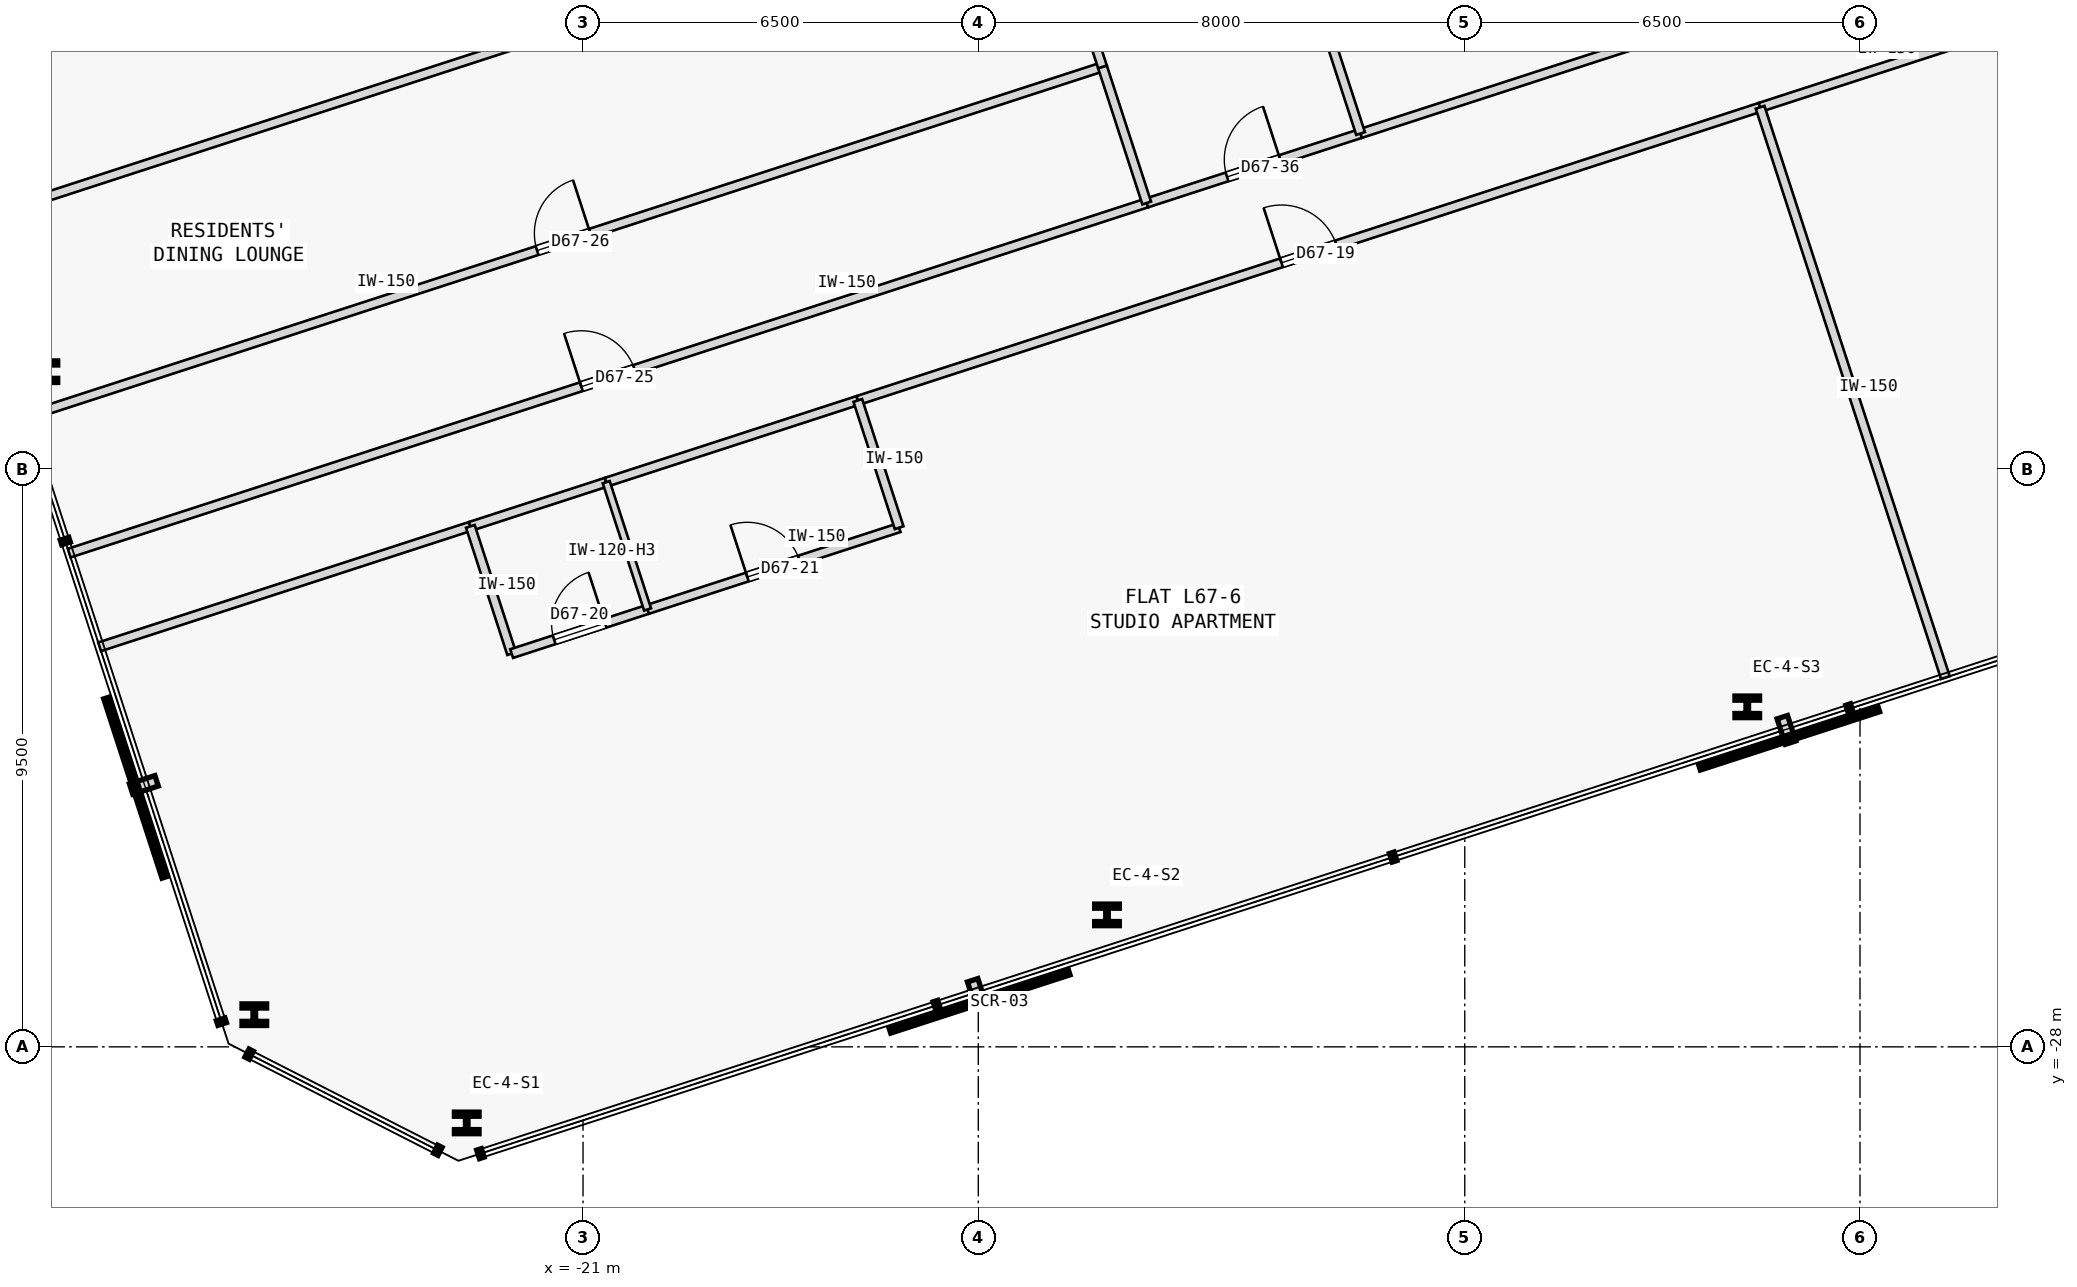
"""IFC4 building model, lengths in metres.
Left out: names, types, materials, properties, quantities, classifications, styles, units other than length and angle.
Written with IfcOpenShell. Run it as: python <this file> out.ifc"""

import sys

from ifc_helpers import new_model, si_unit, direction, frame, frame_2d, origin, origin_2d, place, context, subcontext, project, spatial, rectangle, i_section, extrude, element, fill, save


model = new_model("IFC4")
c1 = context("Model", 3, precision=1e-05, world=origin(), true_north=direction((0.0, 1.0)))
c2 = subcontext(c1, "Body", "Model", "MODEL_VIEW")
j1 = project(units=[si_unit("LENGTHUNIT", "METRE"), si_unit("PLANEANGLEUNIT", "RADIAN")], contexts=[c1])
p1 = place(None, origin())
s1 = spatial("IfcSite", under=j1, at=p1, CompositionType="ELEMENT")
p2 = place(p1, origin())
s2 = spatial("IfcBuilding", under=s1, at=p2, CompositionType="ELEMENT")
p3 = place(p2, frame((0.0, 0.0, 251.1)))
s3 = spatial("IfcBuildingStorey", under=s2, at=p3, CompositionType="ELEMENT", Elevation=251.1)
for number, where, z_axis, x_axis in (
    (1, (-22.913, -29.251, 0.0), (0.0, 0.0, 1.0), (1.0, 0.0, 0.0)),
    (2, (-12.384, -25.83, 0.0), (0.0, 0.0, 1.0), (1.0, 0.0, 0.0)),
    (3, (-1.854, -22.409, 0.0), (0.0, 0.0, 1.0), (1.0, 0.0, 0.0)),
    (4, (-29.842, -16.897, 0.0), (0.0, 0.0, 1.0), (1.0, 0.0, 0.0)),
    (5, (-26.406, -27.471, 0.0), (0.0, 0.0, 1.0), (1.0, 0.0, 0.0)),
):
    element("IfcColumn", number, at=place(p3, frame(where, z_axis=z_axis, x_axis=x_axis)), inside=s3, PredefinedType="COLUMN", context=c2, shape_type="SweptSolid", body=[
        extrude(i_section(OverallWidth=0.405, OverallDepth=0.355, WebThickness=0.042, FlangeThickness=0.068, FilletRadius=0.015, at=origin_2d()), origin(), (0.0, 0.0, 1.0), 3.35),
    ])
p4 = place(p3, frame((-28.95, -21.421, 0.0), z_axis=(0.0, 0.0, 1.0), x_axis=(0.951048062645, 0.309043010825, 0.0)))
e6 = element("IfcWall", 6, at=p4, inside=s3, PredefinedType="PARTITIONING", context=c2, shape_type="SweptSolid", body=[
    extrude(rectangle(XDim=6.41, YDim=0.15, at=frame_2d((3.205, 0.0))), origin(), (0.0, 0.0, 1.0), 2.95),
])
p5 = place(p3, frame((-16.482, -17.37, 0.0), z_axis=(0.0, 0.0, 1.0), x_axis=(0.9510563751, 0.309017428929, 0.0)))
e7 = element("IfcWall", 7, at=p5, inside=s3, PredefinedType="PARTITIONING", context=c2, shape_type="SweptSolid", body=[
    extrude(rectangle(XDim=15.602, YDim=0.15, at=frame_2d((7.801, 0.0))), origin(), (0.0, 0.0, 1.0), 2.95),
])
p6 = place(p5, frame((7.326, 0.0, 0.0)))
e8 = element("IfcOpeningElement", 8, at=p6, cuts=e7, PredefinedType="OPENING", context=c2, shape_type="SweptSolid", body=[
    extrude(rectangle(XDim=0.95, YDim=2.15, at=frame_2d((0.475, 1.075))), frame((0.0, 0.085, 0.0), z_axis=(0.0, -1.0, 0.0), x_axis=(1.0, 0.0, 0.0)), (0.0, 0.0, 1.0), 0.17),
])
p7 = place(p3, frame((-22.854, -19.44, 0.0), z_axis=(0.0, 0.0, 1.0), x_axis=(0.951076048914, 0.308956872689, 0.0)))
e9 = element("IfcWall", 9, at=p7, inside=s3, PredefinedType="PARTITIONING", context=c2, shape_type="SweptSolid", body=[
    extrude(rectangle(XDim=2.35, YDim=0.15, at=frame_2d((1.175, 0.0))), origin(), (0.0, 0.0, 1.0), 2.95),
])
p8 = place(p3, frame((-20.619, -18.714, 0.0), z_axis=(0.0, 0.0, 1.0), x_axis=(0.951052627573, 0.309028962374, 0.0)))
e10 = element("IfcWall", 10, at=p8, inside=s3, PredefinedType="PARTITIONING", context=c2, shape_type="SweptSolid", body=[
    extrude(rectangle(XDim=4.35, YDim=0.15, at=frame_2d((2.175, 0.0))), origin(), (0.0, 0.0, 1.0), 2.95),
])
p9 = place(p3, frame((-1.643, -12.549, 0.0), z_axis=(0.0, 0.0, 1.0), x_axis=(0.951058161173, 0.309011931914, 0.0)))
e11 = element("IfcWall", 11, at=p9, inside=s3, PredefinedType="PARTITIONING", context=c2, shape_type="SweptSolid", body=[
    extrude(rectangle(XDim=7.297, YDim=0.15, at=frame_2d((3.648, 0.0))), origin(), (0.0, 0.0, 1.0), 2.95),
])
p10 = place(p3, frame((-29.45, -19.881, 0.0), z_axis=(0.0, 0.0, 1.0), x_axis=(0.95105650271, 0.309017036186, 0.0)))
e12 = element("IfcWall", 12, at=p10, inside=s3, PredefinedType="PARTITIONING", context=c2, shape_type="SweptSolid", body=[
    extrude(rectangle(XDim=18.632, YDim=0.15, at=frame_2d((9.316, 0.0))), origin(), (0.0, 0.0, 1.0), 2.95),
])
p11 = place(p10, frame((8.856, 0.0, 0.0)))
e13 = element("IfcOpeningElement", 13, at=p11, cuts=e12, PredefinedType="OPENING", context=c2, shape_type="SweptSolid", body=[
    extrude(rectangle(XDim=0.92, YDim=2.15, at=frame_2d((0.46, 1.075))), frame((0.0, 0.085, 0.0), z_axis=(0.0, -1.0, 0.0), x_axis=(1.0, 0.0, 0.0)), (0.0, 0.0, 1.0), 0.17),
])
p12 = place(p3, frame((-11.73, -14.123, 0.0), z_axis=(0.0, 0.0, 1.0), x_axis=(0.951052502763, 0.309029346483, 0.0)))
e14 = element("IfcWall", 14, at=p12, inside=s3, PredefinedType="PARTITIONING", context=c2, shape_type="SweptSolid", body=[
    extrude(rectangle(XDim=3.698, YDim=0.15, at=frame_2d((1.849, 0.0))), origin(), (0.0, 0.0, 1.0), 2.95),
])
p13 = place(p12, frame((1.389, 0.0, 0.0)))
e15 = element("IfcOpeningElement", 15, at=p13, cuts=e14, PredefinedType="OPENING", context=c2, shape_type="SweptSolid", body=[
    extrude(rectangle(XDim=0.92, YDim=2.15, at=frame_2d((0.46, 1.075))), frame((0.0, 0.085, 0.0), z_axis=(0.0, -1.0, 0.0), x_axis=(1.0, 0.0, 0.0)), (0.0, 0.0, 1.0), 0.17),
])
p14 = place(p3, frame((-8.213, -12.98, 0.0), z_axis=(0.0, 0.0, 1.0), x_axis=(0.951058260096, 0.309011627456, 0.0)))
e16 = element("IfcWall", 16, at=p14, inside=s3, PredefinedType="PARTITIONING", context=c2, shape_type="SweptSolid", body=[
    extrude(rectangle(XDim=4.746, YDim=0.15, at=frame_2d((2.373, 0.0))), origin(), (0.0, 0.0, 1.0), 2.95),
])
p15 = place(p3, frame((-22.174, -21.533, 0.0), z_axis=(0.0, 0.0, 1.0), x_axis=(-0.309028364152, 0.951052821956, 0.0)))
e17 = element("IfcWall", 17, at=p15, inside=s3, PredefinedType="PARTITIONING", context=c2, shape_type="SweptSolid", body=[
    extrude(rectangle(XDim=2.2, YDim=0.15, at=frame_2d((1.1, 0.0))), origin(), (0.0, 0.0, 1.0), 2.95),
])
p16 = place(p3, frame((-22.174, -21.533, 0.0), z_axis=(0.0, 0.0, 1.0), x_axis=(0.951045519245, 0.309050837767, 0.0)))
e18 = element("IfcWall", 18, at=p16, inside=s3, PredefinedType="PARTITIONING", context=c2, shape_type="SweptSolid", body=[
    extrude(rectangle(XDim=2.35, YDim=0.15, at=frame_2d((1.175, 0.0))), origin(), (0.0, 0.0, 1.0), 2.95),
])
p17 = place(p16, frame((0.735, 0.0, 0.0)))
e19 = element("IfcOpeningElement", 19, at=p17, cuts=e18, PredefinedType="OPENING", context=c2, shape_type="SweptSolid", body=[
    extrude(rectangle(XDim=0.88, YDim=2.15, at=frame_2d((0.44, 1.075))), frame((0.0, 0.085, 0.0), z_axis=(0.0, -1.0, 0.0), x_axis=(1.0, 0.0, 0.0)), (0.0, 0.0, 1.0), 0.17),
])
p18 = place(p3, frame((-19.939, -20.807, 0.0), z_axis=(0.0, 0.0, 1.0), x_axis=(0.951052627573, 0.309028962374, 0.0)))
e20 = element("IfcWall", 20, at=p18, inside=s3, PredefinedType="PARTITIONING", context=c2, shape_type="SweptSolid", body=[
    extrude(rectangle(XDim=4.35, YDim=0.15, at=frame_2d((2.175, 0.0))), origin(), (0.0, 0.0, 1.0), 2.95),
])
p19 = place(p18, frame((1.725, 0.0, 0.0)))
e21 = element("IfcOpeningElement", 21, at=p19, cuts=e20, PredefinedType="OPENING", context=c2, shape_type="SweptSolid", body=[
    extrude(rectangle(XDim=0.9, YDim=2.15, at=frame_2d((0.45, 1.075))), frame((0.0, 0.085, 0.0), z_axis=(0.0, -1.0, 0.0), x_axis=(1.0, 0.0, 0.0)), (0.0, 0.0, 1.0), 0.17),
])
p20 = place(p3, frame((-15.802, -19.462, 0.0), z_axis=(0.0, 0.0, 1.0), x_axis=(-0.309060979314, 0.951042223598, 0.0)))
e22 = element("IfcWall", 22, at=p20, inside=s3, PredefinedType="PARTITIONING", context=c2, shape_type="SweptSolid", body=[
    extrude(rectangle(XDim=2.2, YDim=0.15, at=frame_2d((1.1, 0.0))), origin(), (0.0, 0.0, 1.0), 2.95),
])
p21 = place(p3, frame((1.404, -21.928, 0.0), z_axis=(0.0, 0.0, 1.0), x_axis=(-0.309022258842, 0.95105480575, 0.0)))
e23 = element("IfcWall", 23, at=p21, inside=s3, PredefinedType="PARTITIONING", context=c2, shape_type="SweptSolid", body=[
    extrude(rectangle(XDim=9.862, YDim=0.15, at=frame_2d((4.931, 0.0))), origin(), (0.0, 0.0, 1.0), 2.95),
])
p22 = place(p3, frame((-19.939, -20.807, 0.0), z_axis=(0.0, 0.0, 1.0), x_axis=(-0.309060979314, 0.951042223598, 0.0)))
e24 = element("IfcWall", 24, at=p22, inside=s3, PredefinedType="PARTITIONING", context=c2, shape_type="SweptSolid", body=[
    extrude(rectangle(XDim=2.2, YDim=0.12, at=frame_2d((1.1, 0.0))), origin(), (0.0, 0.0, 1.0), 2.17),
])
p23 = place(p3, frame((-30.178, -17.642, 0.0), z_axis=(0.0, 0.0, 1.0), x_axis=(0.95105650271, 0.309017036186, 0.0)))
e25 = element("IfcWall", 25, at=p23, inside=s3, PredefinedType="PARTITIONING", context=c2, shape_type="SweptSolid", body=[
    extrude(rectangle(XDim=18.632, YDim=0.15, at=frame_2d((9.316, 0.0))), origin(), (0.0, 0.0, 1.0), 2.95),
])
p24 = place(p23, frame((8.856, 0.0, 0.0)))
e26 = element("IfcOpeningElement", 26, at=p24, cuts=e25, PredefinedType="OPENING", context=c2, shape_type="SweptSolid", body=[
    extrude(rectangle(XDim=0.92, YDim=2.15, at=frame_2d((0.46, 1.075))), frame((0.0, 0.085, 0.0), z_axis=(0.0, -1.0, 0.0), x_axis=(1.0, 0.0, 0.0)), (0.0, 0.0, 1.0), 0.17),
])
p25 = place(p3, frame((-11.73, -14.123, 0.0), z_axis=(0.0, 0.0, 1.0), x_axis=(-0.309062621189, 0.951041690035, 0.0)))
e27 = element("IfcWall", 27, at=p25, inside=s3, PredefinedType="PARTITIONING", context=c2, shape_type="SweptSolid", body=[
    extrude(rectangle(XDim=2.354, YDim=0.15, at=frame_2d((1.177, 0.0))), origin(), (0.0, 0.0, 1.0), 2.95),
])
p26 = place(p3, frame((-31.208, -14.471, 0.0), z_axis=(0.0, 0.0, 1.0), x_axis=(0.951057753948, 0.309013185244, 0.0)))
e28 = element("IfcWall", 28, at=p26, inside=s3, PredefinedType="PARTITIONING", context=c2, shape_type="SweptSolid", body=[
    extrude(rectangle(XDim=18.632, YDim=0.15, at=frame_2d((9.316, 0.0))), origin(), (0.0, 0.0, 1.0), 2.95),
])
p27 = place(p3, frame((-12.458, -11.884, 0.0), z_axis=(0.0, 0.0, 1.0), x_axis=(-0.308946982245, 0.951079261766, 0.0)))
e29 = element("IfcWall", 29, at=p27, inside=s3, PredefinedType="PARTITIONING", context=c2, shape_type="SweptSolid", body=[
    extrude(rectangle(XDim=3.334, YDim=0.15, at=frame_2d((1.667, 0.0))), origin(), (0.0, 0.0, 1.0), 2.95),
])
p28 = place(p3, frame((-8.213, -12.98, 0.0), z_axis=(0.0, 0.0, 1.0), x_axis=(-0.309017065592, 0.951056493155, 0.0)))
e30 = element("IfcWall", 30, at=p28, inside=s3, PredefinedType="PARTITIONING", context=c2, shape_type="SweptSolid", body=[
    extrude(rectangle(XDim=7.76, YDim=0.15, at=frame_2d((3.88, 0.0))), origin(), (0.0, 0.0, 1.0), 2.5),
])
p29 = place(p6, origin())
e31 = element("IfcDoor", 31, at=p29, inside=s3, OperationType="SINGLE_SWING_LEFT", PredefinedType="DOOR", context=c2, shape_type="SweptSolid", body=[
    extrude(rectangle(XDim=0.95, YDim=2.15, at=frame_2d((0.475, 1.075))), frame((0.0, 0.025, 0.0), z_axis=(0.0, -1.0, 0.0), x_axis=(1.0, 0.0, 0.0)), (0.0, 0.0, 1.0), 0.05),
])
fill(e8, e31)
p30 = place(p17, origin())
e32 = element("IfcDoor", 32, at=p30, inside=s3, OperationType="SINGLE_SWING_RIGHT", PredefinedType="DOOR", context=c2, shape_type="SweptSolid", body=[
    extrude(rectangle(XDim=0.88, YDim=2.15, at=frame_2d((0.44, 1.075))), frame((0.0, 0.025, 0.0), z_axis=(0.0, -1.0, 0.0), x_axis=(1.0, 0.0, 0.0)), (0.0, 0.0, 1.0), 0.05),
])
fill(e19, e32)
p31 = place(p19, origin())
e33 = element("IfcDoor", 33, at=p31, inside=s3, OperationType="SINGLE_SWING_LEFT", PredefinedType="DOOR", context=c2, shape_type="SweptSolid", body=[
    extrude(rectangle(XDim=0.9, YDim=2.15, at=frame_2d((0.45, 1.075))), frame((0.0, 0.025, 0.0), z_axis=(0.0, -1.0, 0.0), x_axis=(1.0, 0.0, 0.0)), (0.0, 0.0, 1.0), 0.05),
])
fill(e21, e33)
p32 = place(p11, origin())
e34 = element("IfcDoor", 34, at=p32, inside=s3, OperationType="SINGLE_SWING_LEFT", PredefinedType="DOOR", context=c2, shape_type="SweptSolid", body=[
    extrude(rectangle(XDim=0.92, YDim=2.15, at=frame_2d((0.46, 1.075))), frame((0.0, 0.025, 0.0), z_axis=(0.0, -1.0, 0.0), x_axis=(1.0, 0.0, 0.0)), (0.0, 0.0, 1.0), 0.05),
])
fill(e13, e34)
p33 = place(p24, origin())
e35 = element("IfcDoor", 35, at=p33, inside=s3, OperationType="SINGLE_SWING_RIGHT", PredefinedType="DOOR", context=c2, shape_type="SweptSolid", body=[
    extrude(rectangle(XDim=0.92, YDim=2.15, at=frame_2d((0.46, 1.075))), frame((0.0, 0.025, 0.0), z_axis=(0.0, -1.0, 0.0), x_axis=(1.0, 0.0, 0.0)), (0.0, 0.0, 1.0), 0.05),
])
fill(e26, e35)
p34 = place(p13, origin())
e36 = element("IfcDoor", 36, at=p34, inside=s3, OperationType="SINGLE_SWING_RIGHT", PredefinedType="DOOR", context=c2, shape_type="SweptSolid", body=[
    extrude(rectangle(XDim=0.92, YDim=2.15, at=frame_2d((0.46, 1.075))), frame((0.0, 0.025, 0.0), z_axis=(0.0, -1.0, 0.0), x_axis=(1.0, 0.0, 0.0)), (0.0, 0.0, 1.0), 0.05),
])
fill(e15, e36)
save(model, sys.argv[1])
